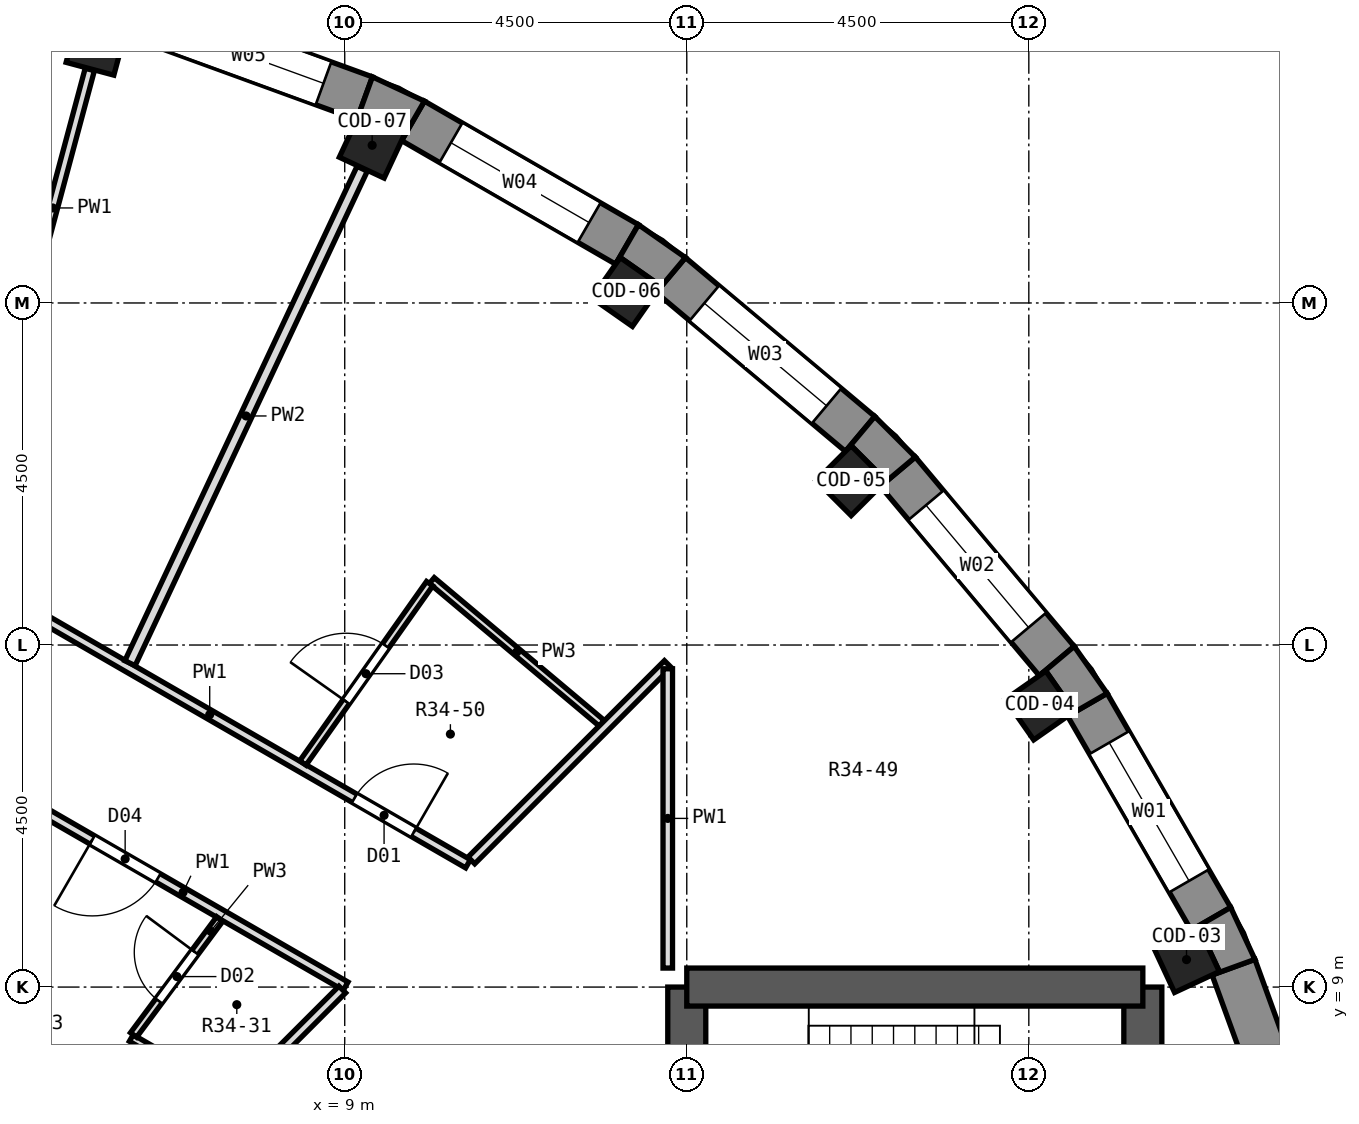
"""IFC4 building model, lengths in metres.
Left out: names, types, materials, properties, quantities, classifications, styles, units other than length and angle.
Written with IfcOpenShell. Run it as: python <this file> out.ifc"""

import sys

from ifc_helpers import new_model, si_unit, direction, frame, frame_2d, origin, origin_2d, place, context, subcontext, project, spatial, polyline, rectangle, outline, extrude, element, fill, save


model = new_model("IFC4")
c1 = context("Model", 3, precision=1e-05, world=origin(), true_north=direction((0.0, 1.0)))
c2 = subcontext(c1, "Body", "Model", "MODEL_VIEW")
j1 = project(units=[si_unit("LENGTHUNIT", "METRE"), si_unit("PLANEANGLEUNIT", "RADIAN")], contexts=[c1])
p1 = place(None, origin())
s1 = spatial("IfcSite", under=j1, at=p1, CompositionType="ELEMENT")
p2 = place(p1, origin())
s2 = spatial("IfcBuilding", under=s1, at=p2, CompositionType="ELEMENT")
p3 = place(p2, frame((0.0, 0.0, 239.6)))
s3 = spatial("IfcBuildingStorey", under=s2, at=p3, CompositionType="ELEMENT", Elevation=239.6)
for number, where, z_axis, x_axis in (
    (1, (20.075, 9.361, 0.0), (0.0, 0.0, 1.0), (0.906, 0.423, 0.0)),
    (2, (18.144, 12.705, 0.0), (0.0, 0.0, 1.0), (0.819, 0.574, 0.0)),
    (3, (15.662, 15.662, 0.0), (0.0, 0.0, 1.0), (0.707, 0.707, 0.0)),
    (4, (12.705, 18.144, 0.0), (0.0, 0.0, 1.0), (0.574, 0.819, 0.0)),
    (5, (9.361, 20.075, 0.0), (0.0, 0.0, 1.0), (0.423, 0.906, 0.0)),
    (6, (5.733, 21.395, 0.0), (0.0, 0.0, 1.0), (0.259, 0.966, 0.0)),
):
    element("IfcColumn", number, at=place(p3, frame(where, z_axis=z_axis, x_axis=x_axis)), inside=s3, PredefinedType="COLUMN", context=c2, shape_type="SweptSolid", body=[
        extrude(rectangle(XDim=0.65, YDim=0.65, at=origin_2d()), origin(), (0.0, 0.0, 1.0), 3.3),
    ])
p4 = place(p3, frame((13.5, -9.0, 0.0), z_axis=(0.0, 0.0, 1.0), x_axis=(0.0, 1.0, 0.0)))
e7 = element("IfcWall", 7, at=p4, inside=s3, PredefinedType="SHEAR", context=c2, shape_type="SweptSolid", body=[
    extrude(rectangle(XDim=18.0, YDim=0.5, at=frame_2d((9.0, 0.0))), origin(), (0.0, 0.0, 1.0), 3.3),
])
p5 = place(p4, frame((15.4, 0.0, 0.0)))
e8 = element("IfcOpeningElement", 8, at=p5, cuts=e7, PredefinedType="OPENING", context=c2, shape_type="SweptSolid", body=[
    extrude(rectangle(XDim=1.2, YDim=2.1, at=frame_2d((0.6, 1.05))), frame((0.0, 0.262, 0.0), z_axis=(0.0, -1.0, 0.0), x_axis=(1.0, 0.0, 0.0)), (0.0, 0.0, 1.0), 0.524),
])
p6 = place(p4, frame((1.4, 0.0, 0.0)))
e9 = element("IfcOpeningElement", 9, at=p6, cuts=e7, PredefinedType="OPENING", context=c2, shape_type="SweptSolid", body=[
    extrude(rectangle(XDim=1.2, YDim=2.1, at=frame_2d((0.6, 1.05))), frame((0.0, 0.262, 0.0), z_axis=(0.0, -1.0, 0.0), x_axis=(1.0, 0.0, 0.0)), (0.0, 0.0, 1.0), 0.524),
])
p7 = place(p4, frame((7.5, 0.0, 0.0)))
e10 = element("IfcOpeningElement", 10, at=p7, cuts=e7, PredefinedType="OPENING", context=c2, shape_type="SweptSolid", body=[
    extrude(rectangle(XDim=3.0, YDim=2.4, at=frame_2d((1.5, 1.2))), frame((0.0, 0.262, 0.0), z_axis=(0.0, -1.0, 0.0), x_axis=(1.0, 0.0, 0.0)), (0.0, 0.0, 1.0), 0.524),
])
p8 = place(p3, frame((19.5, -9.0, 0.0), z_axis=(0.0, 0.0, 1.0), x_axis=(0.0, 1.0, 0.0)))
e11 = element("IfcWall", 11, at=p8, inside=s3, PredefinedType="SHEAR", context=c2, shape_type="SweptSolid", body=[
    extrude(rectangle(XDim=18.0, YDim=0.5, at=frame_2d((9.0, 0.0))), origin(), (0.0, 0.0, 1.0), 3.3),
])
p9 = place(p8, frame((9.45, 0.0, 0.0)))
e12 = element("IfcOpeningElement", 12, at=p9, cuts=e11, PredefinedType="OPENING", context=c2, shape_type="SweptSolid", body=[
    extrude(rectangle(XDim=0.9, YDim=2.1, at=frame_2d((0.45, 1.05))), frame((0.0, 0.262, 0.0), z_axis=(0.0, -1.0, 0.0), x_axis=(1.0, 0.0, 0.0)), (0.0, 0.0, 1.0), 0.524),
])
p10 = place(p8, frame((7.65, 0.0, 0.0)))
e13 = element("IfcOpeningElement", 13, at=p10, cuts=e11, PredefinedType="OPENING", context=c2, shape_type="SweptSolid", body=[
    extrude(rectangle(XDim=0.9, YDim=2.1, at=frame_2d((0.45, 1.05))), frame((0.0, 0.262, 0.0), z_axis=(0.0, -1.0, 0.0), x_axis=(1.0, 0.0, 0.0)), (0.0, 0.0, 1.0), 0.524),
])
p11 = place(p3, frame((13.5, 9.0, 0.0), z_axis=(0.0, 0.0, 1.0), x_axis=(1.0, 0.0, 0.0)))
e14 = element("IfcWall", 14, at=p11, inside=s3, PredefinedType="SHEAR", context=c2, shape_type="SweptSolid", body=[
    extrude(rectangle(XDim=6.0, YDim=0.5, at=frame_2d((3.0, 0.0))), origin(), (0.0, 0.0, 1.0), 3.3),
])
p12 = place(p3, frame((21.805, 6.206, 0.0), z_axis=(0.0, 0.0, 1.0), x_axis=(-0.342056509473, 0.939679383794, 0.0)))
e15 = element("IfcWall", 15, at=p12, inside=s3, PredefinedType="SOLIDWALL", context=c2, shape_type="SweptSolid", body=[
    extrude(rectangle(XDim=3.252, YDim=0.6, at=frame_2d((1.626, 0.0))), origin(), (0.0, 0.0, 1.0), 2.9),
])
p13 = place(p3, frame((20.396, 9.898, 0.0), z_axis=(0.0, 0.0, 1.0), x_axis=(-0.500014901547, 0.866016800201, 0.0)))
e16 = element("IfcWall", 16, at=p13, inside=s3, PredefinedType="SOLIDWALL", context=c2, shape_type="SweptSolid", body=[
    extrude(rectangle(XDim=3.252, YDim=0.6, at=frame_2d((1.626, 0.0))), origin(), (0.0, 0.0, 1.0), 2.9),
])
p14 = place(p13, frame((0.576, 0.0, 0.9)))
e17 = element("IfcOpeningElement", 17, at=p14, cuts=e16, PredefinedType="OPENING", context=c2, shape_type="SweptSolid", body=[
    extrude(rectangle(XDim=2.1, YDim=1.8, at=frame_2d((1.05, 0.9))), frame((0.0, 0.312, 0.0), z_axis=(0.0, -1.0, 0.0), x_axis=(1.0, 0.0, 0.0)), (0.0, 0.0, 1.0), 0.624),
])
p15 = place(p3, frame((18.367, 13.29, 0.0), z_axis=(0.0, 0.0, 1.0), x_axis=(-0.64277291405, 0.766056773982, 0.0)))
e18 = element("IfcWall", 18, at=p15, inside=s3, PredefinedType="SOLIDWALL", context=c2, shape_type="SweptSolid", body=[
    extrude(rectangle(XDim=3.252, YDim=0.6, at=frame_2d((1.626, 0.0))), origin(), (0.0, 0.0, 1.0), 2.9),
])
p16 = place(p15, frame((0.576, 0.0, 0.9)))
e19 = element("IfcOpeningElement", 19, at=p16, cuts=e18, PredefinedType="OPENING", context=c2, shape_type="SweptSolid", body=[
    extrude(rectangle(XDim=2.1, YDim=1.8, at=frame_2d((1.05, 0.9))), frame((0.0, 0.312, 0.0), z_axis=(0.0, -1.0, 0.0), x_axis=(1.0, 0.0, 0.0)), (0.0, 0.0, 1.0), 0.624),
])
p17 = place(p3, frame((15.781, 16.277, 0.0), z_axis=(0.0, 0.0, 1.0), x_axis=(-0.766056773982, 0.64277291405, 0.0)))
e20 = element("IfcWall", 20, at=p17, inside=s3, PredefinedType="SOLIDWALL", context=c2, shape_type="SweptSolid", body=[
    extrude(rectangle(XDim=3.252, YDim=0.6, at=frame_2d((1.626, 0.0))), origin(), (0.0, 0.0, 1.0), 2.9),
])
p18 = place(p17, frame((0.576, 0.0, 0.9)))
e21 = element("IfcOpeningElement", 21, at=p18, cuts=e20, PredefinedType="OPENING", context=c2, shape_type="SweptSolid", body=[
    extrude(rectangle(XDim=2.1, YDim=1.8, at=frame_2d((1.05, 0.9))), frame((0.0, 0.312, 0.0), z_axis=(0.0, -1.0, 0.0), x_axis=(1.0, 0.0, 0.0)), (0.0, 0.0, 1.0), 0.624),
])
p19 = place(p3, frame((12.714, 18.77, 0.0), z_axis=(0.0, 0.0, 1.0), x_axis=(-0.866016800201, 0.500014901547, 0.0)))
e22 = element("IfcWall", 22, at=p19, inside=s3, PredefinedType="SOLIDWALL", context=c2, shape_type="SweptSolid", body=[
    extrude(rectangle(XDim=3.252, YDim=0.6, at=frame_2d((1.626, 0.0))), origin(), (0.0, 0.0, 1.0), 2.9),
])
p20 = place(p19, frame((0.576, 0.0, 0.9)))
e23 = element("IfcOpeningElement", 23, at=p20, cuts=e22, PredefinedType="OPENING", context=c2, shape_type="SweptSolid", body=[
    extrude(rectangle(XDim=2.1, YDim=1.8, at=frame_2d((1.05, 0.9))), frame((0.0, 0.312, 0.0), z_axis=(0.0, -1.0, 0.0), x_axis=(1.0, 0.0, 0.0)), (0.0, 0.0, 1.0), 0.624),
])
p21 = place(p3, frame((9.262, 20.693, 0.0), z_axis=(0.0, 0.0, 1.0), x_axis=(-0.939679383794, 0.342056509473, 0.0)))
e24 = element("IfcWall", 24, at=p21, inside=s3, PredefinedType="SOLIDWALL", context=c2, shape_type="SweptSolid", body=[
    extrude(rectangle(XDim=3.252, YDim=0.6, at=frame_2d((1.626, 0.0))), origin(), (0.0, 0.0, 1.0), 2.9),
])
p22 = place(p21, frame((0.576, 0.0, 0.9)))
e25 = element("IfcOpeningElement", 25, at=p22, cuts=e24, PredefinedType="OPENING", context=c2, shape_type="SweptSolid", body=[
    extrude(rectangle(XDim=2.1, YDim=1.8, at=frame_2d((1.05, 0.9))), frame((0.0, 0.312, 0.0), z_axis=(0.0, -1.0, 0.0), x_axis=(1.0, 0.0, 0.0)), (0.0, 0.0, 1.0), 0.624),
])
p23 = place(p3, origin())
e26 = element("IfcWall", 26, at=p23, inside=s3, PredefinedType="SOLIDWALL", context=c2, shape_type="SweptSolid", body=[
    extrude(outline(polyline([(20.975, 9.364), (20.656, 10.048), (20.136, 9.748), (20.232, 9.793), (20.507, 9.204), (20.411, 9.159), (20.975, 9.364)])), origin(), (0.0, 0.0, 1.0), 2.9),
])
p24 = place(p3, origin())
e27 = element("IfcWall", 27, at=p24, inside=s3, PredefinedType="SOLIDWALL", context=c2, shape_type="SweptSolid", body=[
    extrude(outline(polyline([(19.03, 12.864), (18.597, 13.482), (18.137, 13.097), (18.224, 13.157), (18.597, 12.625), (18.51, 12.564), (19.03, 12.864)])), origin(), (0.0, 0.0, 1.0), 2.9),
])
p25 = place(p3, origin())
e28 = element("IfcWall", 28, at=p25, inside=s3, PredefinedType="SOLIDWALL", context=c2, shape_type="SweptSolid", body=[
    extrude(outline(polyline([(15.973, 16.507), (15.588, 16.047), (15.662, 16.122), (16.122, 15.662), (16.047, 15.588), (16.507, 15.973), (15.973, 16.507)])), origin(), (0.0, 0.0, 1.0), 2.9),
])
p26 = place(p3, origin())
e29 = element("IfcWall", 29, at=p26, inside=s3, PredefinedType="SOLIDWALL", context=c2, shape_type="SweptSolid", body=[
    extrude(outline(polyline([(12.864, 19.03), (12.564, 18.51), (12.625, 18.597), (13.157, 18.224), (13.097, 18.137), (13.482, 18.597), (12.864, 19.03)])), origin(), (0.0, 0.0, 1.0), 2.9),
])
p27 = place(p3, origin())
e30 = element("IfcWall", 30, at=p27, inside=s3, PredefinedType="SOLIDWALL", context=c2, shape_type="SweptSolid", body=[
    extrude(outline(polyline([(10.048, 20.656), (9.364, 20.975), (9.159, 20.411), (9.204, 20.507), (9.793, 20.232), (9.748, 20.136), (10.048, 20.656)])), origin(), (0.0, 0.0, 1.0), 2.9),
])
p28 = place(p3, frame((5.907, 6.173, 0.0), z_axis=(0.0, 0.0, 1.0), x_axis=(-0.866028316509, 0.499994954979, 0.0)))
e31 = element("IfcWall", 31, at=p28, inside=s3, PredefinedType="SOLIDWALL", context=c2, shape_type="SweptSolid", body=[
    extrude(rectangle(XDim=4.059, YDim=0.6, at=frame_2d((2.029, 0.0))), origin(), (0.0, 0.0, 1.0), 2.9),
])
p29 = place(p28, frame((0.829, 0.0, 0.9)))
e32 = element("IfcOpeningElement", 32, at=p29, cuts=e31, PredefinedType="OPENING", context=c2, shape_type="SweptSolid", body=[
    extrude(rectangle(XDim=2.4, YDim=1.8, at=frame_2d((1.2, 0.9))), frame((0.0, 0.312, 0.0), z_axis=(0.0, -1.0, 0.0), x_axis=(1.0, 0.0, 0.0)), (0.0, 0.0, 1.0), 0.624),
])
p30 = place(p3, frame((10.146, 14.348, 0.0), z_axis=(0.0, 0.0, 1.0), x_axis=(0.765810272607, -0.643066580044, 0.0)))
e33 = element("IfcWall", 33, at=p30, inside=s3, PredefinedType="PARTITIONING", context=c2, shape_type="SweptSolid", body=[
    extrude(rectangle(XDim=2.92, YDim=0.1, at=frame_2d((1.46, 0.0))), origin(), (0.0, 0.0, 1.0), 2.9),
])
p31 = place(p3, frame((6.192, 8.33, 0.0), z_axis=(0.0, 0.0, 1.0), x_axis=(0.865863509184, -0.500280304893, 0.0)))
e34 = element("IfcWall", 34, at=p31, inside=s3, PredefinedType="PARTITIONING", context=c2, shape_type="SweptSolid", body=[
    extrude(rectangle(XDim=1.503, YDim=0.1, at=frame_2d((0.751, 0.0))), origin(), (0.0, 0.0, 1.0), 2.9),
])
p32 = place(p3, frame((3.236, 12.346, 0.0), z_axis=(0.0, 0.0, 1.0), x_axis=(0.866074652738, -0.499914688607, 0.0)))
e35 = element("IfcWall", 35, at=p32, inside=s3, PredefinedType="PARTITIONING", context=c2, shape_type="SweptSolid", body=[
    extrude(rectangle(XDim=6.67, YDim=0.125, at=frame_2d((3.335, 0.0))), origin(), (0.0, 0.0, 1.0), 2.9),
])
p33 = place(p32, frame((2.82, 0.0, 0.0)))
e36 = element("IfcOpeningElement", 36, at=p33, cuts=e35, PredefinedType="OPENING", context=c2, shape_type="SweptSolid", body=[
    extrude(rectangle(XDim=1.0, YDim=2.1, at=frame_2d((0.5, 1.05))), frame((0.0, 0.074, 0.0), z_axis=(0.0, -1.0, 0.0), x_axis=(1.0, 0.0, 0.0)), (0.0, 0.0, 1.0), 0.149),
])
p34 = place(p3, frame((3.824, 14.547, 0.0), z_axis=(0.0, 0.0, 1.0), x_axis=(0.866027606468, -0.499996184821, 0.0)))
e37 = element("IfcWall", 37, at=p34, inside=s3, PredefinedType="PARTITIONING", context=c2, shape_type="SweptSolid", body=[
    extrude(rectangle(XDim=7.849, YDim=0.125, at=frame_2d((3.925, 0.0))), origin(), (0.0, 0.0, 1.0), 2.9),
])
p35 = place(p34, frame((6.124, 0.0, 0.0)))
e38 = element("IfcOpeningElement", 38, at=p35, cuts=e37, PredefinedType="OPENING", context=c2, shape_type="SweptSolid", body=[
    extrude(rectangle(XDim=0.9, YDim=2.1, at=frame_2d((0.45, 1.05))), frame((0.0, 0.074, 0.0), z_axis=(0.0, -1.0, 0.0), x_axis=(1.0, 0.0, 0.0)), (0.0, 0.0, 1.0), 0.149),
])
p36 = place(p3, frame((6.677, 6.677, 0.0), z_axis=(0.0, 0.0, 1.0), x_axis=(0.707106781187, 0.707106781187, 0.0)))
e39 = element("IfcWall", 39, at=p36, inside=s3, PredefinedType="PARTITIONING", context=c2, shape_type="SweptSolid", body=[
    extrude(rectangle(XDim=3.24, YDim=0.125, at=frame_2d((1.62, 0.0))), origin(), (0.0, 0.0, 1.0), 2.9),
])
p37 = place(p3, frame((10.666, 10.666, 0.0), z_axis=(0.0, 0.0, 1.0), x_axis=(0.707106781187, 0.707106781187, 0.0)))
e40 = element("IfcWall", 40, at=p37, inside=s3, PredefinedType="PARTITIONING", context=c2, shape_type="SweptSolid", body=[
    extrude(rectangle(XDim=3.654, YDim=0.125, at=frame_2d((1.827, 0.0))), origin(), (0.0, 0.0, 1.0), 2.9),
])
p38 = place(p3, frame((6.222, 8.37, 0.0), z_axis=(0.0, 0.0, 1.0), x_axis=(0.596480065154, 0.802627891289, 0.0)))
e41 = element("IfcWall", 41, at=p38, inside=s3, PredefinedType="PARTITIONING", context=c2, shape_type="SweptSolid", body=[
    extrude(rectangle(XDim=1.901, YDim=0.1, at=frame_2d((0.95, 0.0))), origin(), (0.0, 0.0, 1.0), 2.9),
])
p39 = place(p38, frame((0.557, 0.0, 0.0)))
e42 = element("IfcOpeningElement", 42, at=p39, cuts=e41, PredefinedType="OPENING", context=c2, shape_type="SweptSolid", body=[
    extrude(rectangle(XDim=0.8, YDim=2.1, at=frame_2d((0.4, 1.05))), frame((0.0, 0.062, 0.0), z_axis=(0.0, -1.0, 0.0), x_axis=(1.0, 0.0, 0.0)), (0.0, 0.0, 1.0), 0.124),
])
p40 = place(p3, frame((8.449, 11.948, 0.0), z_axis=(0.0, 0.0, 1.0), x_axis=(0.577346566694, 0.816499198975, 0.0)))
e43 = element("IfcWall", 43, at=p40, inside=s3, PredefinedType="PARTITIONING", context=c2, shape_type="SweptSolid", body=[
    extrude(rectangle(XDim=2.889, YDim=0.1, at=frame_2d((1.444, 0.0))), origin(), (0.0, 0.0, 1.0), 2.9),
])
p41 = place(p40, frame((0.988, 0.0, 0.0)))
e44 = element("IfcOpeningElement", 44, at=p41, cuts=e43, PredefinedType="OPENING", context=c2, shape_type="SweptSolid", body=[
    extrude(rectangle(XDim=0.9, YDim=2.1, at=frame_2d((0.45, 1.05))), frame((0.0, 0.062, 0.0), z_axis=(0.0, -1.0, 0.0), x_axis=(1.0, 0.0, 0.0)), (0.0, 0.0, 1.0), 0.124),
])
p42 = place(p3, frame((6.175, 13.261, 0.0), z_axis=(0.0, 0.0, 1.0), x_axis=(0.425078700153, 0.905156394595, 0.0)))
e45 = element("IfcWall", 45, at=p42, inside=s3, PredefinedType="PARTITIONING", context=c2, shape_type="SweptSolid", body=[
    extrude(rectangle(XDim=7.187, YDim=0.15, at=frame_2d((3.593, 0.0))), origin(), (0.0, 0.0, 1.0), 2.9),
])
p43 = place(p3, frame((4.671, 17.428, 0.0), z_axis=(0.0, 0.0, 1.0), x_axis=(0.258585096905, 0.965988482156, 0.0)))
e46 = element("IfcWall", 46, at=p43, inside=s3, PredefinedType="PARTITIONING", context=c2, shape_type="SweptSolid", body=[
    extrude(rectangle(XDim=3.772, YDim=0.125, at=frame_2d((1.886, 0.0))), origin(), (0.0, 0.0, 1.0), 2.9),
])
p44 = place(p3, frame((13.25, 9.25, 0.0), z_axis=(0.0, 0.0, 1.0), x_axis=(0.0, 1.0, 0.0)))
e47 = element("IfcWall", 47, at=p44, inside=s3, PredefinedType="PARTITIONING", context=c2, shape_type="SweptSolid", body=[
    extrude(rectangle(XDim=3.938, YDim=0.125, at=frame_2d((1.969, 0.0))), origin(), (0.0, 0.0, 1.0), 2.9),
])
p45 = place(p14, origin())
e48 = element("IfcWindow", 48, at=p45, inside=s3, PartitioningType="SINGLE_PANEL", PredefinedType="WINDOW", context=c2, shape_type="SweptSolid", body=[
    extrude(rectangle(XDim=2.1, YDim=1.8, at=frame_2d((1.05, 0.9))), frame((0.0, 0.18, 0.0), z_axis=(0.0, -1.0, 0.0), x_axis=(1.0, 0.0, 0.0)), (0.0, 0.0, 1.0), 0.06),
])
fill(e17, e48)
p46 = place(p16, origin())
e49 = element("IfcWindow", 49, at=p46, inside=s3, PartitioningType="SINGLE_PANEL", PredefinedType="WINDOW", context=c2, shape_type="SweptSolid", body=[
    extrude(rectangle(XDim=2.1, YDim=1.8, at=frame_2d((1.05, 0.9))), frame((0.0, 0.18, 0.0), z_axis=(0.0, -1.0, 0.0), x_axis=(1.0, 0.0, 0.0)), (0.0, 0.0, 1.0), 0.06),
])
fill(e19, e49)
p47 = place(p18, origin())
e50 = element("IfcWindow", 50, at=p47, inside=s3, PartitioningType="SINGLE_PANEL", PredefinedType="WINDOW", context=c2, shape_type="SweptSolid", body=[
    extrude(rectangle(XDim=2.1, YDim=1.8, at=frame_2d((1.05, 0.9))), frame((0.0, 0.18, 0.0), z_axis=(0.0, -1.0, 0.0), x_axis=(1.0, 0.0, 0.0)), (0.0, 0.0, 1.0), 0.06),
])
fill(e21, e50)
p48 = place(p20, origin())
e51 = element("IfcWindow", 51, at=p48, inside=s3, PartitioningType="SINGLE_PANEL", PredefinedType="WINDOW", context=c2, shape_type="SweptSolid", body=[
    extrude(rectangle(XDim=2.1, YDim=1.8, at=frame_2d((1.05, 0.9))), frame((0.0, 0.18, 0.0), z_axis=(0.0, -1.0, 0.0), x_axis=(1.0, 0.0, 0.0)), (0.0, 0.0, 1.0), 0.06),
])
fill(e23, e51)
p49 = place(p22, origin())
e52 = element("IfcWindow", 52, at=p49, inside=s3, PartitioningType="SINGLE_PANEL", PredefinedType="WINDOW", context=c2, shape_type="SweptSolid", body=[
    extrude(rectangle(XDim=2.1, YDim=1.8, at=frame_2d((1.05, 0.9))), frame((0.0, 0.18, 0.0), z_axis=(0.0, -1.0, 0.0), x_axis=(1.0, 0.0, 0.0)), (0.0, 0.0, 1.0), 0.06),
])
fill(e25, e52)
p50 = place(p35, origin())
e53 = element("IfcDoor", 53, at=p50, inside=s3, OperationType="SINGLE_SWING_RIGHT", PredefinedType="DOOR", context=c2, shape_type="SweptSolid", body=[
    extrude(rectangle(XDim=0.9, YDim=2.1, at=frame_2d((0.45, 1.05))), frame((0.0, 0.025, 0.0), z_axis=(0.0, -1.0, 0.0), x_axis=(1.0, 0.0, 0.0)), (0.0, 0.0, 1.0), 0.05),
])
fill(e38, e53)
p51 = place(p39, origin())
e54 = element("IfcDoor", 54, at=p51, inside=s3, OperationType="SINGLE_SWING_RIGHT", PredefinedType="DOOR", context=c2, shape_type="SweptSolid", body=[
    extrude(rectangle(XDim=0.8, YDim=2.1, at=frame_2d((0.4, 1.05))), frame((0.0, 0.025, 0.0), z_axis=(0.0, -1.0, 0.0), x_axis=(1.0, 0.0, 0.0)), (0.0, 0.0, 1.0), 0.05),
])
fill(e42, e54)
p52 = place(p41, origin())
e55 = element("IfcDoor", 55, at=p52, inside=s3, OperationType="SINGLE_SWING_LEFT", PredefinedType="DOOR", context=c2, shape_type="SweptSolid", body=[
    extrude(rectangle(XDim=0.9, YDim=2.1, at=frame_2d((0.45, 1.05))), frame((0.0, 0.025, 0.0), z_axis=(0.0, -1.0, 0.0), x_axis=(1.0, 0.0, 0.0)), (0.0, 0.0, 1.0), 0.05),
])
fill(e44, e55)
p53 = place(p33, frame((1.0, 0.0, 0.0), z_axis=(0.0, 0.0, 1.0), x_axis=(-1.0, 0.0, 0.0)))
e56 = element("IfcDoor", 56, at=p53, inside=s3, OperationType="SINGLE_SWING_RIGHT", PredefinedType="DOOR", context=c2, shape_type="SweptSolid", body=[
    extrude(rectangle(XDim=1.0, YDim=2.1, at=frame_2d((0.5, 1.05))), frame((0.0, 0.025, 0.0), z_axis=(0.0, -1.0, 0.0), x_axis=(1.0, 0.0, 0.0)), (0.0, 0.0, 1.0), 0.05),
])
fill(e36, e56)
save(model, sys.argv[1])
